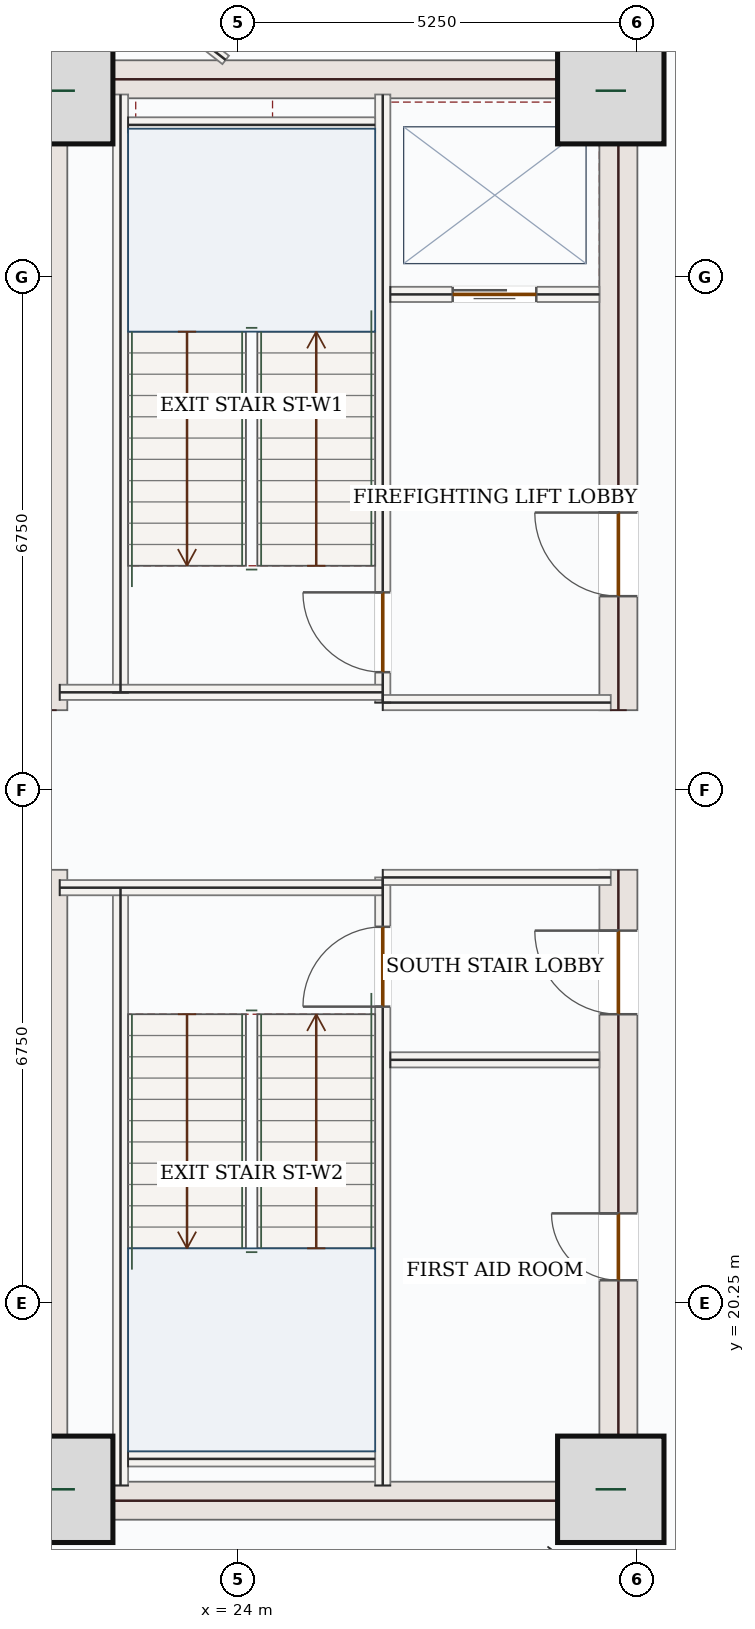
"""IFC4 building model, lengths in metres.
Left out: names, types, materials, properties, quantities, classifications, styles, units other than length and angle.
Written with IfcOpenShell. Run it as: python <this file> out.ifc"""

import sys

from ifc_helpers import new_model, si_unit, direction, frame, frame_2d, origin, origin_2d, place, context, subcontext, project, spatial, rectangle, extrude, source, transform, mapped, element, fill, save


model = new_model("IFC4")
c1 = context("Model", 3, precision=1e-05, world=origin(), true_north=direction((0.0, 1.0)))
c2 = subcontext(c1, "Body", "Model", "MODEL_VIEW")
j1 = project(units=[si_unit("LENGTHUNIT", "METRE"), si_unit("PLANEANGLEUNIT", "RADIAN")], contexts=[c1])
p1 = place(None, origin())
s1 = spatial("IfcSite", under=j1, at=p1, CompositionType="ELEMENT")
p2 = place(p1, origin())
s2 = spatial("IfcBuilding", under=s1, at=p2, CompositionType="ELEMENT")
p3 = place(p2, frame((0.0, 0.0, 104.7)))
s3 = spatial("IfcBuildingStorey", under=s2, at=p3, CompositionType="ELEMENT", Elevation=104.7)
m1 = source(origin(), c2, "Body", "SweptSolid", [
    extrude(rectangle(XDim=8.55, YDim=0.5, at=frame_2d((4.275, 0.0))), origin(), (0.0, 0.0, 1.0), 3.95),
])
for number, where, z_axis, x_axis in (
    (1, (21.5, 17.4, 0.0), (0.0, 0.0, 1.0), (0.0, 1.0, 0.0)),
    (2, (21.5, 28.05, 0.0), (0.0, 0.0, 1.0), (0.0, 1.0, 0.0)),
):
    element("IfcWall", number, at=place(p3, frame(where, z_axis=z_axis, x_axis=x_axis)), inside=s3, PredefinedType="SHEAR", context=c2, shape_type="MappedRepresentation", body=[
        mapped(m1, transform((0.0, 0.0, 0.0), x_axis=(1.0, 0.0, 0.0), y_axis=(0.0, 1.0, 0.0), z_axis=(0.0, 0.0, 1.0), scale=1.0)),
    ])
p4 = place(p3, frame((29.0, 17.4, 0.0), z_axis=(0.0, 0.0, 1.0), x_axis=(0.0, 1.0, 0.0)))
e3 = element("IfcWall", 3, at=p4, inside=s3, PredefinedType="SHEAR", context=c2, shape_type="SweptSolid", body=[
    extrude(rectangle(XDim=8.55, YDim=0.5, at=frame_2d((4.275, 0.0))), origin(), (0.0, 0.0, 1.0), 3.95),
])
p5 = place(p4, frame((6.65, 0.0, 0.0)))
e4 = element("IfcOpeningElement", 4, at=p5, cuts=e3, PredefinedType="OPENING", context=c2, shape_type="SweptSolid", body=[
    extrude(rectangle(XDim=1.1, YDim=2.2, at=frame_2d((0.55, 1.1))), frame((0.0, 0.26, 0.0), z_axis=(0.0, -1.0, 0.0), x_axis=(1.0, 0.0, 0.0)), (0.0, 0.0, 1.0), 0.52),
])
p6 = place(p4, frame((3.15, 0.0, 0.0)))
e5 = element("IfcOpeningElement", 5, at=p6, cuts=e3, PredefinedType="OPENING", context=c2, shape_type="SweptSolid", body=[
    extrude(rectangle(XDim=0.88, YDim=2.1, at=frame_2d((0.44, 1.05))), frame((0.0, 0.26, 0.0), z_axis=(0.0, -1.0, 0.0), x_axis=(1.0, 0.0, 0.0)), (0.0, 0.0, 1.0), 0.52),
])
p7 = place(p3, frame((29.0, 28.05, 0.0), z_axis=(0.0, 0.0, 1.0), x_axis=(0.0, 1.0, 0.0)))
e6 = element("IfcWall", 6, at=p7, inside=s3, PredefinedType="SHEAR", context=c2, shape_type="SweptSolid", body=[
    extrude(rectangle(XDim=8.55, YDim=0.5, at=frame_2d((4.275, 0.0))), origin(), (0.0, 0.0, 1.0), 3.95),
])
p8 = place(p7, frame((1.5, 0.0, 0.0)))
e7 = element("IfcOpeningElement", 7, at=p8, cuts=e6, PredefinedType="OPENING", context=c2, shape_type="SweptSolid", body=[
    extrude(rectangle(XDim=1.1, YDim=2.2, at=frame_2d((0.55, 1.1))), frame((0.0, 0.26, 0.0), z_axis=(0.0, -1.0, 0.0), x_axis=(1.0, 0.0, 0.0)), (0.0, 0.0, 1.0), 0.52),
])
m2 = source(origin(), c2, "Body", "SweptSolid", [
    extrude(rectangle(XDim=7.0, YDim=0.5, at=frame_2d((3.5, 0.0))), origin(), (0.0, 0.0, 1.0), 3.95),
])
for number, where, z_axis, x_axis in (
    (8, (21.75, 17.65, 0.0), (0.0, 0.0, 1.0), (1.0, 0.0, 0.0)),
    (9, (21.75, 36.35, 0.0), (0.0, 0.0, 1.0), (1.0, 0.0, 0.0)),
):
    element("IfcWall", number, at=place(p3, frame(where, z_axis=z_axis, x_axis=x_axis)), inside=s3, PredefinedType="SHEAR", context=c2, shape_type="MappedRepresentation", body=[
        mapped(m2, transform((0.0, 0.0, 0.0), x_axis=(1.0, 0.0, 0.0), y_axis=(0.0, 1.0, 0.0), z_axis=(0.0, 0.0, 1.0), scale=1.0)),
    ])
m3 = source(origin(), c2, "Body", "SweptSolid", [
    extrude(rectangle(XDim=1.4, YDim=1.4, at=origin_2d()), origin(), (0.0, 0.0, 1.0), 4.2),
])
for number, where, z_axis, x_axis in (
    (10, (21.65, 17.8, 0.0), (0.0, 0.0, 1.0), (1.0, 0.0, 0.0)),
    (11, (28.9, 17.8, 0.0), (0.0, 0.0, 1.0), (1.0, 0.0, 0.0)),
    (12, (21.65, 36.2, 0.0), (0.0, 0.0, 1.0), (1.0, 0.0, 0.0)),
    (13, (28.9, 36.2, 0.0), (0.0, 0.0, 1.0), (1.0, 0.0, 0.0)),
):
    element("IfcColumn", number, at=place(p3, frame(where, z_axis=z_axis, x_axis=x_axis)), inside=s3, PredefinedType="COLUMN", context=c2, shape_type="MappedRepresentation", body=[
        mapped(m3, transform((0.0, 0.0, 0.0), x_axis=(1.0, 0.0, 0.0), y_axis=(0.0, 1.0, 0.0), z_axis=(0.0, 0.0, 1.0), scale=1.0)),
    ])
p9 = place(p3, frame((22.658, 14.74, 0.0), z_axis=(0.0, 0.0, 1.0), x_axis=(-0.707106781187, 0.707106781187, 0.0)))
e14 = element("IfcWall", 14, at=p9, inside=s3, PredefinedType="SOLIDWALL", context=c2, shape_type="SweptSolid", body=[
    extrude(rectangle(XDim=4.99, YDim=0.32, at=frame_2d((2.495, 0.0))), origin(), (0.0, 0.0, 1.0), 3.95),
])
p10 = place(p9, frame((1.295, 0.0, 0.85)))
e15 = element("IfcOpeningElement", 15, at=p10, cuts=e14, PredefinedType="OPENING", context=c2, shape_type="SweptSolid", body=[
    extrude(rectangle(XDim=2.4, YDim=1.8, at=frame_2d((1.2, 0.9))), frame((0.0, 0.17, 0.0), z_axis=(0.0, -1.0, 0.0), x_axis=(1.0, 0.0, 0.0)), (0.0, 0.0, 1.0), 0.34),
])
m4 = source(origin(), c2, "Body", "SweptSolid", [
    extrude(rectangle(XDim=5.258, YDim=0.32, at=frame_2d((2.629, 0.0))), origin(), (0.0, 0.0, 1.0), 3.95),
])
p11 = place(p3, frame((18.94, 35.542, 0.0), z_axis=(0.0, 0.0, 1.0), x_axis=(0.707106781187, 0.707106781187, 0.0)))
e16 = element("IfcWall", 16, at=p11, inside=s3, PredefinedType="SOLIDWALL", context=c2, shape_type="MappedRepresentation", body=[
    mapped(m4, transform((0.0, 0.0, 0.0), x_axis=(1.0, 0.0, 0.0), y_axis=(0.0, 1.0, 0.0), z_axis=(0.0, 0.0, 1.0), scale=1.0)),
])
m5 = source(origin(), c2, "Body", "SweptSolid", [
    extrude(rectangle(XDim=7.87, YDim=0.2, at=frame_2d((3.935, 0.0))), origin(), (0.0, 0.0, 1.0), 3.95),
])
for number, where, z_axis, x_axis in (
    (17, (22.45, 17.85, 0.0), (0.0, 0.0, 1.0), (0.0, 1.0, 0.0)),
    (18, (22.45, 28.28, 0.0), (0.0, 0.0, 1.0), (0.0, 1.0, 0.0)),
):
    element("IfcWall", number, at=place(p3, frame(where, z_axis=z_axis, x_axis=x_axis)), inside=s3, PredefinedType="SOLIDWALL", context=c2, shape_type="MappedRepresentation", body=[
        mapped(m5, transform((0.0, 0.0, 0.0), x_axis=(1.0, 0.0, 0.0), y_axis=(0.0, 1.0, 0.0), z_axis=(0.0, 0.0, 1.0), scale=1.0)),
    ])
p12 = place(p3, frame((25.9, 17.85, 0.0), z_axis=(0.0, 0.0, 1.0), x_axis=(0.0, 1.0, 0.0)))
e19 = element("IfcWall", 19, at=p12, inside=s3, PredefinedType="SOLIDWALL", context=c2, shape_type="SweptSolid", body=[
    extrude(rectangle(XDim=8.0, YDim=0.2, at=frame_2d((4.0, 0.0))), origin(), (0.0, 0.0, 1.0), 3.95),
])
p13 = place(p12, frame((6.3, 0.0, 0.0)))
e20 = element("IfcOpeningElement", 20, at=p13, cuts=e19, PredefinedType="OPENING", context=c2, shape_type="SweptSolid", body=[
    extrude(rectangle(XDim=1.05, YDim=2.15, at=frame_2d((0.525, 1.075))), frame((0.0, 0.11, 0.0), z_axis=(0.0, -1.0, 0.0), x_axis=(1.0, 0.0, 0.0)), (0.0, 0.0, 1.0), 0.22),
])
p14 = place(p3, frame((25.9, 28.15, 0.0), z_axis=(0.0, 0.0, 1.0), x_axis=(0.0, 1.0, 0.0)))
e21 = element("IfcWall", 21, at=p14, inside=s3, PredefinedType="SOLIDWALL", context=c2, shape_type="SweptSolid", body=[
    extrude(rectangle(XDim=8.0, YDim=0.2, at=frame_2d((4.0, 0.0))), origin(), (0.0, 0.0, 1.0), 3.95),
])
p15 = place(p14, frame((0.4, 0.0, 0.0)))
e22 = element("IfcOpeningElement", 22, at=p15, cuts=e21, PredefinedType="OPENING", context=c2, shape_type="SweptSolid", body=[
    extrude(rectangle(XDim=1.05, YDim=2.15, at=frame_2d((0.525, 1.075))), frame((0.0, 0.11, 0.0), z_axis=(0.0, -1.0, 0.0), x_axis=(1.0, 0.0, 0.0)), (0.0, 0.0, 1.0), 0.22),
])
m6 = source(origin(), c2, "Body", "SweptSolid", [
    extrude(rectangle(XDim=4.25, YDim=0.2, at=frame_2d((2.125, 0.0))), origin(), (0.0, 0.0, 1.0), 3.95),
])
p16 = place(p3, frame((21.65, 25.715, 0.0), z_axis=(0.0, 0.0, 1.0), x_axis=(1.0, 0.0, 0.0)))
e23 = element("IfcWall", 23, at=p16, inside=s3, PredefinedType="SOLIDWALL", context=c2, shape_type="MappedRepresentation", body=[
    mapped(m6, transform((0.0, 0.0, 0.0), x_axis=(1.0, 0.0, 0.0), y_axis=(0.0, 1.0, 0.0), z_axis=(0.0, 0.0, 1.0), scale=1.0)),
])
m7 = source(origin(), c2, "Body", "SweptSolid", [
    extrude(rectangle(XDim=3.0, YDim=0.2, at=frame_2d((1.5, 0.0))), origin(), (0.0, 0.0, 1.0), 3.95),
])
p17 = place(p3, frame((25.9, 25.85, 0.0), z_axis=(0.0, 0.0, 1.0), x_axis=(1.0, 0.0, 0.0)))
e24 = element("IfcWall", 24, at=p17, inside=s3, PredefinedType="SOLIDWALL", context=c2, shape_type="MappedRepresentation", body=[
    mapped(m7, transform((0.0, 0.0, 0.0), x_axis=(1.0, 0.0, 0.0), y_axis=(0.0, 1.0, 0.0), z_axis=(0.0, 0.0, 1.0), scale=1.0)),
])
p18 = place(p3, frame((21.65, 28.285, 0.0), z_axis=(0.0, 0.0, 1.0), x_axis=(1.0, 0.0, 0.0)))
e25 = element("IfcWall", 25, at=p18, inside=s3, PredefinedType="SOLIDWALL", context=c2, shape_type="MappedRepresentation", body=[
    mapped(m6, transform((0.0, 0.0, 0.0), x_axis=(1.0, 0.0, 0.0), y_axis=(0.0, 1.0, 0.0), z_axis=(0.0, 0.0, 1.0), scale=1.0)),
])
p19 = place(p3, frame((25.9, 28.15, 0.0), z_axis=(0.0, 0.0, 1.0), x_axis=(1.0, 0.0, 0.0)))
e26 = element("IfcWall", 26, at=p19, inside=s3, PredefinedType="SOLIDWALL", context=c2, shape_type="MappedRepresentation", body=[
    mapped(m7, transform((0.0, 0.0, 0.0), x_axis=(1.0, 0.0, 0.0), y_axis=(0.0, 1.0, 0.0), z_axis=(0.0, 0.0, 1.0), scale=1.0)),
])
m8 = source(origin(), c2, "Body", "SweptSolid", [
    extrude(rectangle(XDim=3.25, YDim=0.2, at=frame_2d((1.625, 0.0))), origin(), (0.0, 0.0, 1.0), 3.95),
])
for number, where, z_axis, x_axis in (
    (27, (22.55, 35.75, 0.0), (0.0, 0.0, 1.0), (1.0, 0.0, 0.0)),
    (28, (22.55, 18.2, 0.0), (0.0, 0.0, 1.0), (1.0, 0.0, 0.0)),
):
    element("IfcWall", number, at=place(p3, frame(where, z_axis=z_axis, x_axis=x_axis)), inside=s3, PredefinedType="SOLIDWALL", context=c2, shape_type="MappedRepresentation", body=[
        mapped(m8, transform((0.0, 0.0, 0.0), x_axis=(1.0, 0.0, 0.0), y_axis=(0.0, 1.0, 0.0), z_axis=(0.0, 0.0, 1.0), scale=1.0)),
    ])
p20 = place(p3, frame((26.0, 33.52, 0.0), z_axis=(0.0, 0.0, 1.0), x_axis=(1.0, 0.0, 0.0)))
e29 = element("IfcWall", 29, at=p20, inside=s3, PredefinedType="SOLIDWALL", context=c2, shape_type="SweptSolid", body=[
    extrude(rectangle(XDim=2.75, YDim=0.2, at=frame_2d((1.375, 0.0))), origin(), (0.0, 0.0, 1.0), 3.95),
])
p21 = place(p20, frame((0.82, 0.0, 0.0)))
e30 = element("IfcOpeningElement", 30, at=p21, cuts=e29, PredefinedType="OPENING", context=c2, shape_type="SweptSolid", body=[
    extrude(rectangle(XDim=1.1, YDim=2.15, at=frame_2d((0.55, 1.075))), frame((0.0, 0.11, 0.0), z_axis=(0.0, -1.0, 0.0), x_axis=(1.0, 0.0, 0.0)), (0.0, 0.0, 1.0), 0.22),
])
m9 = source(origin(), c2, "Body", "SweptSolid", [
    extrude(rectangle(XDim=2.75, YDim=0.2, at=frame_2d((1.375, 0.0))), origin(), (0.0, 0.0, 1.0), 3.95),
])
p22 = place(p3, frame((26.0, 23.45, 0.0), z_axis=(0.0, 0.0, 1.0), x_axis=(1.0, 0.0, 0.0)))
e31 = element("IfcWall", 31, at=p22, inside=s3, PredefinedType="SOLIDWALL", context=c2, shape_type="MappedRepresentation", body=[
    mapped(m9, transform((0.0, 0.0, 0.0), x_axis=(1.0, 0.0, 0.0), y_axis=(0.0, 1.0, 0.0), z_axis=(0.0, 0.0, 1.0), scale=1.0)),
])
m10 = source(origin(), c2, "Body", "SweptSolid", [
    extrude(rectangle(XDim=2.563, YDim=0.14, at=frame_2d((1.282, 0.0))), origin(), (0.0, 0.0, 1.0), 3.95),
])
p23 = place(p3, frame((21.811, 38.18, 0.0), z_axis=(0.0, 0.0, 1.0), x_axis=(0.789034129839, -0.614349364734, 0.0)))
e32 = element("IfcWall", 32, at=p23, inside=s3, PredefinedType="PARTITIONING", context=c2, shape_type="MappedRepresentation", body=[
    mapped(m10, transform((0.0, 0.0, 0.0), x_axis=(1.0, 0.0, 0.0), y_axis=(0.0, 1.0, 0.0), z_axis=(0.0, 0.0, 1.0), scale=1.0)),
])
m11 = source(origin(), c2, "Body", "SweptSolid", [
    extrude(rectangle(XDim=2.629, YDim=0.14, at=frame_2d((1.315, 0.0))), origin(), (0.0, 0.0, 1.0), 3.95),
])
p24 = place(p3, frame((28.154, 16.98, 0.0), z_axis=(0.0, 0.0, 1.0), x_axis=(-0.614210560268, -0.789142184689, 0.0)))
e33 = element("IfcWall", 33, at=p24, inside=s3, PredefinedType="PARTITIONING", context=c2, shape_type="MappedRepresentation", body=[
    mapped(m11, transform((0.0, 0.0, 0.0), x_axis=(1.0, 0.0, 0.0), y_axis=(0.0, 1.0, 0.0), z_axis=(0.0, 0.0, 1.0), scale=1.0)),
])
m12 = source(origin(), c2, "Body", "SweptSolid", [
    extrude(rectangle(XDim=2.4, YDim=1.8, at=frame_2d((1.2, 0.9))), frame((0.0, 0.03, 0.0), z_axis=(0.0, -1.0, 0.0), x_axis=(1.0, 0.0, 0.0)), (0.0, 0.0, 1.0), 0.06),
])
p25 = place(p10, origin())
e34 = element("IfcWindow", 34, at=p25, inside=s3, PartitioningType="DOUBLE_PANEL_VERTICAL", PredefinedType="WINDOW", context=c2, shape_type="MappedRepresentation", body=[
    mapped(m12, transform((0.0, 0.0, 0.0), x_axis=(1.0, 0.0, 0.0), y_axis=(0.0, 1.0, 0.0), z_axis=(0.0, 0.0, 1.0), scale=1.0)),
])
fill(e15, e34)
m13 = source(origin(), c2, "Body", "SweptSolid", [
    extrude(rectangle(XDim=1.05, YDim=2.15, at=frame_2d((0.525, 1.075))), frame((0.0, 0.025, 0.0), z_axis=(0.0, -1.0, 0.0), x_axis=(1.0, 0.0, 0.0)), (0.0, 0.0, 1.0), 0.05),
])
p26 = place(p15, origin())
e35 = element("IfcDoor", 35, at=p26, inside=s3, OperationType="SINGLE_SWING_RIGHT", PredefinedType="DOOR", context=c2, shape_type="MappedRepresentation", body=[
    mapped(m13, transform((0.0, 0.0, 0.0), x_axis=(1.0, 0.0, 0.0), y_axis=(0.0, 1.0, 0.0), z_axis=(0.0, 0.0, 1.0), scale=1.0)),
])
fill(e22, e35)
p27 = place(p13, origin())
e36 = element("IfcDoor", 36, at=p27, inside=s3, OperationType="SINGLE_SWING_LEFT", PredefinedType="DOOR", context=c2, shape_type="MappedRepresentation", body=[
    mapped(m13, transform((0.0, 0.0, 0.0), x_axis=(1.0, 0.0, 0.0), y_axis=(0.0, 1.0, 0.0), z_axis=(0.0, 0.0, 1.0), scale=1.0)),
])
fill(e20, e36)
m14 = source(origin(), c2, "Body", "SweptSolid", [
    extrude(rectangle(XDim=1.1, YDim=2.15, at=frame_2d((0.55, 1.075))), frame((0.0, 0.025, 0.0), z_axis=(0.0, -1.0, 0.0), x_axis=(1.0, 0.0, 0.0)), (0.0, 0.0, 1.0), 0.05),
])
p28 = place(p21, origin())
e37 = element("IfcDoor", 37, at=p28, inside=s3, OperationType="DOUBLE_DOOR_SLIDING", PredefinedType="DOOR", context=c2, shape_type="MappedRepresentation", body=[
    mapped(m14, transform((0.0, 0.0, 0.0), x_axis=(1.0, 0.0, 0.0), y_axis=(0.0, 1.0, 0.0), z_axis=(0.0, 0.0, 1.0), scale=1.0)),
])
fill(e30, e37)
m15 = source(origin(), c2, "Body", "SweptSolid", [
    extrude(rectangle(XDim=1.1, YDim=2.2, at=frame_2d((0.55, 1.1))), frame((0.0, 0.025, 0.0), z_axis=(0.0, -1.0, 0.0), x_axis=(1.0, 0.0, 0.0)), (0.0, 0.0, 1.0), 0.05),
])
p29 = place(p8, origin())
e38 = element("IfcDoor", 38, at=p29, inside=s3, OperationType="SINGLE_SWING_RIGHT", PredefinedType="DOOR", context=c2, shape_type="MappedRepresentation", body=[
    mapped(m15, transform((0.0, 0.0, 0.0), x_axis=(1.0, 0.0, 0.0), y_axis=(0.0, 1.0, 0.0), z_axis=(0.0, 0.0, 1.0), scale=1.0)),
])
fill(e7, e38)
p30 = place(p5, origin())
e39 = element("IfcDoor", 39, at=p30, inside=s3, OperationType="SINGLE_SWING_RIGHT", PredefinedType="DOOR", context=c2, shape_type="MappedRepresentation", body=[
    mapped(m15, transform((0.0, 0.0, 0.0), x_axis=(1.0, 0.0, 0.0), y_axis=(0.0, 1.0, 0.0), z_axis=(0.0, 0.0, 1.0), scale=1.0)),
])
fill(e4, e39)
m16 = source(origin(), c2, "Body", "SweptSolid", [
    extrude(rectangle(XDim=0.88, YDim=2.1, at=frame_2d((0.44, 1.05))), frame((0.0, 0.025, 0.0), z_axis=(0.0, -1.0, 0.0), x_axis=(1.0, 0.0, 0.0)), (0.0, 0.0, 1.0), 0.05),
])
p31 = place(p6, origin())
e40 = element("IfcDoor", 40, at=p31, inside=s3, OperationType="SINGLE_SWING_RIGHT", PredefinedType="DOOR", context=c2, shape_type="MappedRepresentation", body=[
    mapped(m16, transform((0.0, 0.0, 0.0), x_axis=(1.0, 0.0, 0.0), y_axis=(0.0, 1.0, 0.0), z_axis=(0.0, 0.0, 1.0), scale=1.0)),
])
fill(e5, e40)
save(model, sys.argv[1])
